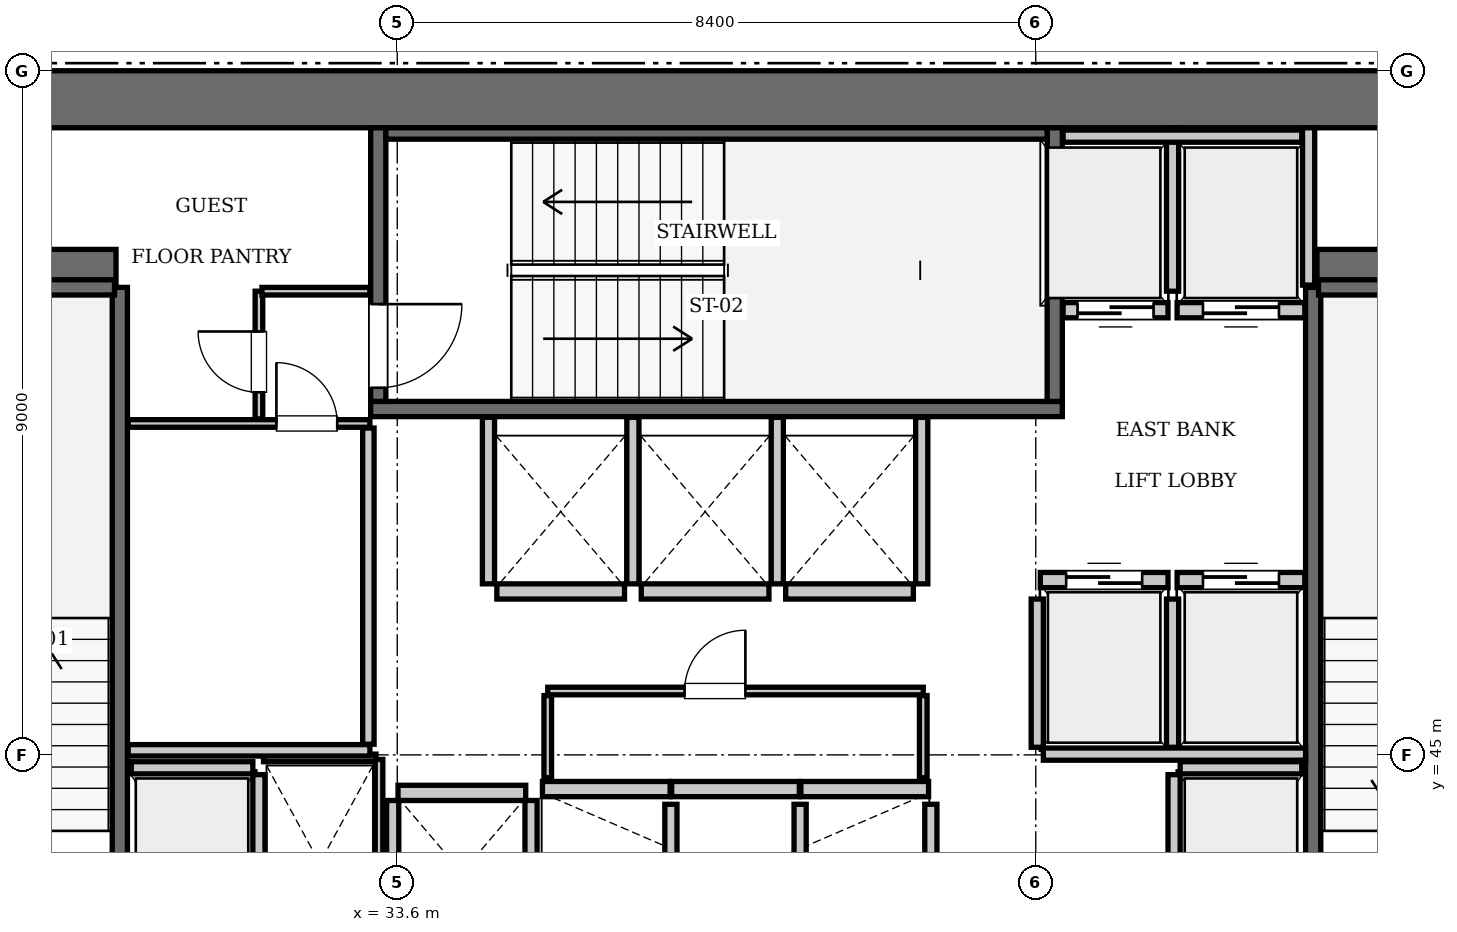
"""IFC4 building model, lengths in metres.
Left out: names, types, materials, properties, quantities, classifications, styles, units other than length and angle.
Written with IfcOpenShell. Run it as: python <this file> out.ifc"""

import sys

from ifc_helpers import new_model, si_unit, direction, frame, frame_2d, origin, place, context, subcontext, project, spatial, rectangle, extrude, element, fill, save


model = new_model("IFC4")
c1 = context("Model", 3, precision=1e-05, world=origin(), true_north=direction((0.0, 1.0)))
c2 = subcontext(c1, "Body", "Model", "MODEL_VIEW")
j1 = project(units=[si_unit("LENGTHUNIT", "METRE"), si_unit("PLANEANGLEUNIT", "RADIAN")], contexts=[c1])
p1 = place(None, origin())
s1 = spatial("IfcSite", under=j1, at=p1, CompositionType="ELEMENT")
p2 = place(p1, origin())
s2 = spatial("IfcBuilding", under=s1, at=p2, CompositionType="ELEMENT")
p3 = place(p2, frame((0.0, 0.0, 173.6)))
s3 = spatial("IfcBuildingStorey", under=s2, at=p3, CompositionType="ELEMENT", Elevation=173.6)
p4 = place(p3, frame((25.2, 53.625, 0.0), z_axis=(0.0, 0.0, 1.0), x_axis=(1.0, 0.0, 0.0)))
e1 = element("IfcWall", 1, at=p4, inside=s3, PredefinedType="SHEAR", context=c2, shape_type="SweptSolid", body=[
    extrude(rectangle(XDim=25.2, YDim=0.75, at=frame_2d((12.6, 0.0))), origin(), (0.0, 0.0, 1.0), 3.85),
])
for number, where, z_axis, x_axis in (
    (2, (25.95, 51.4, 0.0), (0.0, 0.0, 1.0), (1.0, 0.0, 0.0)),
    (3, (45.7, 51.4, 0.0), (0.0, 0.0, 1.0), (1.0, 0.0, 0.0)),
):
    element("IfcWall", number, at=place(p3, frame(where, z_axis=z_axis, x_axis=x_axis)), inside=s3, PredefinedType="SHEAR", context=c2, shape_type="SweptSolid", body=[
        extrude(rectangle(XDim=3.95, YDim=0.5, at=frame_2d((1.975, 0.0))), origin(), (0.0, 0.0, 1.0), 3.85),
    ])
p5 = place(p3, frame((29.95, 42.15, 0.0), z_axis=(0.0, 0.0, 1.0), x_axis=(0.0, 1.0, 0.0)))
e4 = element("IfcWall", 4, at=p5, inside=s3, PredefinedType="SOLIDWALL", context=c2, shape_type="SweptSolid", body=[
    extrude(rectangle(XDim=9.0, YDim=0.2, at=frame_2d((4.5, 0.0))), origin(), (0.0, 0.0, 1.0), 3.61),
])
p6 = place(p3, frame((26.38, 51.15, 0.0), z_axis=(0.0, 0.0, 1.0), x_axis=(1.0, 0.0, 0.0)))
e5 = element("IfcWall", 5, at=p6, inside=s3, PredefinedType="SOLIDWALL", context=c2, shape_type="SweptSolid", body=[
    extrude(rectangle(XDim=3.5, YDim=0.2, at=frame_2d((1.75, 0.0))), origin(), (0.0, 0.0, 1.0), 3.61),
])
p7 = place(p3, frame((33.25, 49.55, 0.0), z_axis=(0.0, 0.0, 1.0), x_axis=(1.0, 0.0, 0.0)))
e6 = element("IfcWall", 6, at=p7, inside=s3, PredefinedType="SOLIDWALL", context=c2, shape_type="SweptSolid", body=[
    extrude(rectangle(XDim=9.1, YDim=0.2, at=frame_2d((4.55, 0.0))), origin(), (0.0, 0.0, 1.0), 3.61),
])
p8 = place(p3, frame((42.25, 49.65, 0.0), z_axis=(0.0, 0.0, 1.0), x_axis=(0.0, 1.0, 0.0)))
e7 = element("IfcWall", 7, at=p8, inside=s3, PredefinedType="SOLIDWALL", context=c2, shape_type="SweptSolid", body=[
    extrude(rectangle(XDim=3.6, YDim=0.2, at=frame_2d((1.8, 0.0))), origin(), (0.0, 0.0, 1.0), 3.61),
])
p9 = place(p3, frame((33.35, 49.65, 0.0), z_axis=(0.0, 0.0, 1.0), x_axis=(0.0, 1.0, 0.0)))
e8 = element("IfcWall", 8, at=p9, inside=s3, PredefinedType="SOLIDWALL", context=c2, shape_type="SweptSolid", body=[
    extrude(rectangle(XDim=3.6, YDim=0.2, at=frame_2d((1.8, 0.0))), origin(), (0.0, 0.0, 1.0), 3.61),
])
p10 = place(p9, frame((0.18, 0.0, 0.0)))
e9 = element("IfcOpeningElement", 9, at=p10, cuts=e8, PredefinedType="OPENING", context=c2, shape_type="SweptSolid", body=[
    extrude(rectangle(XDim=1.1, YDim=2.15, at=frame_2d((0.55, 1.075))), frame((0.0, 0.11, 0.0), z_axis=(0.0, -1.0, 0.0), x_axis=(1.0, 0.0, 0.0)), (0.0, 0.0, 1.0), 0.22),
])
p11 = place(p3, frame((33.45, 53.175, 0.0), z_axis=(0.0, 0.0, 1.0), x_axis=(1.0, 0.0, 0.0)))
e10 = element("IfcWall", 10, at=p11, inside=s3, PredefinedType="SOLIDWALL", context=c2, shape_type="SweptSolid", body=[
    extrude(rectangle(XDim=8.7, YDim=0.15, at=frame_2d((4.35, 0.0))), origin(), (0.0, 0.0, 1.0), 3.61),
])
p12 = place(p3, frame((45.65, 42.15, 0.0), z_axis=(0.0, 0.0, 1.0), x_axis=(0.0, 1.0, 0.0)))
e11 = element("IfcWall", 11, at=p12, inside=s3, PredefinedType="SOLIDWALL", context=c2, shape_type="SweptSolid", body=[
    extrude(rectangle(XDim=9.0, YDim=0.2, at=frame_2d((4.5, 0.0))), origin(), (0.0, 0.0, 1.0), 3.61),
])
p13 = place(p3, frame((45.72, 51.15, 0.0), z_axis=(0.0, 0.0, 1.0), x_axis=(1.0, 0.0, 0.0)))
e12 = element("IfcWall", 12, at=p13, inside=s3, PredefinedType="SOLIDWALL", context=c2, shape_type="SweptSolid", body=[
    extrude(rectangle(XDim=3.5, YDim=0.2, at=frame_2d((1.75, 0.0))), origin(), (0.0, 0.0, 1.0), 3.61),
])
p14 = place(p3, frame((42.06, 47.3, 0.0), z_axis=(0.0, 0.0, 1.0), x_axis=(1.0, 0.0, 0.0)))
e13 = element("IfcWall", 13, at=p14, inside=s3, PredefinedType="SOLIDWALL", context=c2, shape_type="SweptSolid", body=[
    extrude(rectangle(XDim=1.68, YDim=0.2, at=frame_2d((0.84, 0.0))), origin(), (0.0, 0.0, 1.0), 3.61),
])
p15 = place(p14, frame((0.34, 0.0, 0.0)))
e14 = element("IfcOpeningElement", 14, at=p15, cuts=e13, PredefinedType="OPENING", context=c2, shape_type="SweptSolid", body=[
    extrude(rectangle(XDim=1.0, YDim=2.15, at=frame_2d((0.5, 1.075))), frame((0.0, 0.11, 0.0), z_axis=(0.0, -1.0, 0.0), x_axis=(1.0, 0.0, 0.0)), (0.0, 0.0, 1.0), 0.22),
])
p16 = place(p3, frame((43.86, 47.3, 0.0), z_axis=(0.0, 0.0, 1.0), x_axis=(1.0, 0.0, 0.0)))
e15 = element("IfcWall", 15, at=p16, inside=s3, PredefinedType="SOLIDWALL", context=c2, shape_type="SweptSolid", body=[
    extrude(rectangle(XDim=1.68, YDim=0.2, at=frame_2d((0.84, 0.0))), origin(), (0.0, 0.0, 1.0), 3.61),
])
p17 = place(p16, frame((0.34, 0.0, 0.0)))
e16 = element("IfcOpeningElement", 16, at=p17, cuts=e15, PredefinedType="OPENING", context=c2, shape_type="SweptSolid", body=[
    extrude(rectangle(XDim=1.0, YDim=2.15, at=frame_2d((0.5, 1.075))), frame((0.0, 0.11, 0.0), z_axis=(0.0, -1.0, 0.0), x_axis=(1.0, 0.0, 0.0)), (0.0, 0.0, 1.0), 0.22),
])
p18 = place(p3, frame((42.36, 50.85, 0.0), z_axis=(0.0, 0.0, 1.0), x_axis=(1.0, 0.0, 0.0)))
e17 = element("IfcWall", 17, at=p18, inside=s3, PredefinedType="SOLIDWALL", context=c2, shape_type="SweptSolid", body=[
    extrude(rectangle(XDim=1.38, YDim=0.2, at=frame_2d((0.69, 0.0))), origin(), (0.0, 0.0, 1.0), 3.61),
])
p19 = place(p18, frame((0.19, 0.0, 0.0)))
e18 = element("IfcOpeningElement", 18, at=p19, cuts=e17, PredefinedType="OPENING", context=c2, shape_type="SweptSolid", body=[
    extrude(rectangle(XDim=1.0, YDim=2.15, at=frame_2d((0.5, 1.075))), frame((0.0, 0.11, 0.0), z_axis=(0.0, -1.0, 0.0), x_axis=(1.0, 0.0, 0.0)), (0.0, 0.0, 1.0), 0.22),
])
p20 = place(p3, frame((43.86, 50.85, 0.0), z_axis=(0.0, 0.0, 1.0), x_axis=(1.0, 0.0, 0.0)))
e19 = element("IfcWall", 19, at=p20, inside=s3, PredefinedType="SOLIDWALL", context=c2, shape_type="SweptSolid", body=[
    extrude(rectangle(XDim=1.68, YDim=0.2, at=frame_2d((0.84, 0.0))), origin(), (0.0, 0.0, 1.0), 3.61),
])
p21 = place(p20, frame((0.34, 0.0, 0.0)))
e20 = element("IfcOpeningElement", 20, at=p21, cuts=e19, PredefinedType="OPENING", context=c2, shape_type="SweptSolid", body=[
    extrude(rectangle(XDim=1.0, YDim=2.15, at=frame_2d((0.5, 1.075))), frame((0.0, 0.11, 0.0), z_axis=(0.0, -1.0, 0.0), x_axis=(1.0, 0.0, 0.0)), (0.0, 0.0, 1.0), 0.22),
])
for number, where, z_axis, x_axis in (
    (21, (35.51, 44.55, 0.0), (0.0, 0.0, 1.0), (1.0, 0.0, 0.0)),
    (22, (37.21, 44.55, 0.0), (0.0, 0.0, 1.0), (1.0, 0.0, 0.0)),
):
    element("IfcWall", number, at=place(p3, frame(where, z_axis=z_axis, x_axis=x_axis)), inside=s3, PredefinedType="SOLIDWALL", context=c2, shape_type="SweptSolid", body=[
        extrude(rectangle(XDim=1.68, YDim=0.2, at=frame_2d((0.84, 0.0))), origin(), (0.0, 0.0, 1.0), 3.61),
    ])
for number, where, z_axis, x_axis in (
    (23, (38.91, 44.55, 0.0), (0.0, 0.0, 1.0), (1.0, 0.0, 0.0)),
    (24, (34.91, 47.15, 0.0), (0.0, 0.0, 1.0), (1.0, 0.0, 0.0)),
):
    element("IfcWall", number, at=place(p3, frame(where, z_axis=z_axis, x_axis=x_axis)), inside=s3, PredefinedType="SOLIDWALL", context=c2, shape_type="SweptSolid", body=[
        extrude(rectangle(XDim=1.68, YDim=0.2, at=frame_2d((0.84, 0.0))), origin(), (0.0, 0.0, 1.0), 3.61),
    ])
for number, where, z_axis, x_axis in (
    (25, (36.81, 47.15, 0.0), (0.0, 0.0, 1.0), (1.0, 0.0, 0.0)),
    (26, (38.71, 47.15, 0.0), (0.0, 0.0, 1.0), (1.0, 0.0, 0.0)),
    (27, (33.61, 44.5, 0.0), (0.0, 0.0, 1.0), (1.0, 0.0, 0.0)),
):
    element("IfcWall", number, at=place(p3, frame(where, z_axis=z_axis, x_axis=x_axis)), inside=s3, PredefinedType="SOLIDWALL", context=c2, shape_type="SweptSolid", body=[
        extrude(rectangle(XDim=1.68, YDim=0.2, at=frame_2d((0.84, 0.0))), origin(), (0.0, 0.0, 1.0), 3.61),
    ])
p22 = place(p3, frame((30.1, 44.83, 0.0), z_axis=(0.0, 0.0, 1.0), x_axis=(1.0, 0.0, 0.0)))
e28 = element("IfcWall", 28, at=p22, inside=s3, PredefinedType="SOLIDWALL", context=c2, shape_type="SweptSolid", body=[
    extrude(rectangle(XDim=1.6, YDim=0.16, at=frame_2d((0.8, 0.0))), origin(), (0.0, 0.0, 1.0), 3.61),
])
p23 = place(p3, frame((31.78, 42.15, 0.0), z_axis=(0.0, 0.0, 1.0), x_axis=(0.0, 1.0, 0.0)))
e29 = element("IfcWall", 29, at=p23, inside=s3, PredefinedType="SOLIDWALL", context=c2, shape_type="SweptSolid", body=[
    extrude(rectangle(XDim=2.59, YDim=0.16, at=frame_2d((1.295, 0.0))), origin(), (0.0, 0.0, 1.0), 3.61),
])
p24 = place(p3, frame((43.9, 44.83, 0.0), z_axis=(0.0, 0.0, 1.0), x_axis=(1.0, 0.0, 0.0)))
e30 = element("IfcWall", 30, at=p24, inside=s3, PredefinedType="SOLIDWALL", context=c2, shape_type="SweptSolid", body=[
    extrude(rectangle(XDim=1.6, YDim=0.16, at=frame_2d((0.8, 0.0))), origin(), (0.0, 0.0, 1.0), 3.61),
])
p25 = place(p3, frame((43.82, 42.15, 0.0), z_axis=(0.0, 0.0, 1.0), x_axis=(0.0, 1.0, 0.0)))
e31 = element("IfcWall", 31, at=p25, inside=s3, PredefinedType="SOLIDWALL", context=c2, shape_type="SweptSolid", body=[
    extrude(rectangle(XDim=2.59, YDim=0.16, at=frame_2d((1.295, 0.0))), origin(), (0.0, 0.0, 1.0), 3.61),
])
for number, where, z_axis, x_axis in (
    (32, (42.02, 45.1, 0.0), (0.0, 0.0, 1.0), (0.0, 1.0, 0.0)),
    (33, (43.8, 45.1, 0.0), (0.0, 0.0, 1.0), (0.0, 1.0, 0.0)),
):
    element("IfcWall", number, at=place(p3, frame(where, z_axis=z_axis, x_axis=x_axis)), inside=s3, PredefinedType="SOLIDWALL", context=c2, shape_type="SweptSolid", body=[
        extrude(rectangle(XDim=1.95, YDim=0.16, at=frame_2d((0.975, 0.0))), origin(), (0.0, 0.0, 1.0), 3.61),
    ])
p26 = place(p3, frame((42.1, 45.01, 0.0), z_axis=(0.0, 0.0, 1.0), x_axis=(1.0, 0.0, 0.0)))
e34 = element("IfcWall", 34, at=p26, inside=s3, PredefinedType="SOLIDWALL", context=c2, shape_type="SweptSolid", body=[
    extrude(rectangle(XDim=3.45, YDim=0.16, at=frame_2d((1.725, 0.0))), origin(), (0.0, 0.0, 1.0), 3.61),
])
p27 = place(p3, frame((45.59, 51.18, 0.0), z_axis=(0.0, 0.0, 1.0), x_axis=(0.0, 1.0, 0.0)))
e35 = element("IfcWall", 35, at=p27, inside=s3, PredefinedType="SOLIDWALL", context=c2, shape_type="SweptSolid", body=[
    extrude(rectangle(XDim=2.07, YDim=0.16, at=frame_2d((1.035, 0.0))), origin(), (0.0, 0.0, 1.0), 3.61),
])
p28 = place(p3, frame((43.8, 51.1, 0.0), z_axis=(0.0, 0.0, 1.0), x_axis=(0.0, 1.0, 0.0)))
e36 = element("IfcWall", 36, at=p28, inside=s3, PredefinedType="SOLIDWALL", context=c2, shape_type="SweptSolid", body=[
    extrude(rectangle(XDim=2.15, YDim=0.16, at=frame_2d((1.075, 0.0))), origin(), (0.0, 0.0, 1.0), 3.61),
])
p29 = place(p3, frame((42.36, 53.14, 0.0), z_axis=(0.0, 0.0, 1.0), x_axis=(1.0, 0.0, 0.0)))
e37 = element("IfcWall", 37, at=p29, inside=s3, PredefinedType="SOLIDWALL", context=c2, shape_type="SweptSolid", body=[
    extrude(rectangle(XDim=3.14, YDim=0.16, at=frame_2d((1.57, 0.0))), origin(), (0.0, 0.0, 1.0), 3.61),
])
for number, where, z_axis, x_axis in (
    (38, (37.2, 42.15, 0.0), (0.0, 0.0, 1.0), (0.0, 1.0, 0.0)),
    (39, (38.9, 42.15, 0.0), (0.0, 0.0, 1.0), (0.0, 1.0, 0.0)),
    (40, (40.62, 42.15, 0.0), (0.0, 0.0, 1.0), (0.0, 1.0, 0.0)),
):
    element("IfcWall", number, at=place(p3, frame(where, z_axis=z_axis, x_axis=x_axis)), inside=s3, PredefinedType="SOLIDWALL", context=c2, shape_type="SweptSolid", body=[
        extrude(rectangle(XDim=2.2, YDim=0.16, at=frame_2d((1.1, 0.0))), origin(), (0.0, 0.0, 1.0), 3.61),
    ])
for number, where, z_axis, x_axis in (
    (41, (34.8, 47.25, 0.0), (0.0, 0.0, 1.0), (0.0, 1.0, 0.0)),
    (42, (36.7, 47.25, 0.0), (0.0, 0.0, 1.0), (0.0, 1.0, 0.0)),
    (43, (38.6, 47.25, 0.0), (0.0, 0.0, 1.0), (0.0, 1.0, 0.0)),
    (44, (40.5, 47.25, 0.0), (0.0, 0.0, 1.0), (0.0, 1.0, 0.0)),
):
    element("IfcWall", number, at=place(p3, frame(where, z_axis=z_axis, x_axis=x_axis)), inside=s3, PredefinedType="SOLIDWALL", context=c2, shape_type="SweptSolid", body=[
        extrude(rectangle(XDim=2.19, YDim=0.16, at=frame_2d((1.095, 0.0))), origin(), (0.0, 0.0, 1.0), 3.61),
    ])
for number, where, z_axis, x_axis in (
    (45, (33.54, 42.15, 0.0), (0.0, 0.0, 1.0), (0.0, 1.0, 0.0)),
    (46, (35.36, 42.15, 0.0), (0.0, 0.0, 1.0), (0.0, 1.0, 0.0)),
):
    element("IfcWall", number, at=place(p3, frame(where, z_axis=z_axis, x_axis=x_axis)), inside=s3, PredefinedType="SOLIDWALL", context=c2, shape_type="SweptSolid", body=[
        extrude(rectangle(XDim=2.25, YDim=0.16, at=frame_2d((1.125, 0.0))), origin(), (0.0, 0.0, 1.0), 3.61),
    ])
p30 = place(p3, frame((31.84, 44.96, 0.0), z_axis=(0.0, 0.0, 1.0), x_axis=(1.0, 0.0, 0.0)))
e47 = element("IfcWall", 47, at=p30, inside=s3, PredefinedType="PARTITIONING", context=c2, shape_type="SweptSolid", body=[
    extrude(rectangle(XDim=1.48, YDim=0.1, at=frame_2d((0.74, 0.0))), origin(), (0.0, 0.0, 1.0), 3.61),
])
p31 = place(p3, frame((33.36, 42.21, 0.0), z_axis=(0.0, 0.0, 1.0), x_axis=(0.0, 1.0, 0.0)))
e48 = element("IfcWall", 48, at=p31, inside=s3, PredefinedType="PARTITIONING", context=c2, shape_type="SweptSolid", body=[
    extrude(rectangle(XDim=2.73, YDim=0.1, at=frame_2d((1.365, 0.0))), origin(), (0.0, 0.0, 1.0), 3.61),
])
p32 = place(p3, frame((35.58, 45.84, 0.0), z_axis=(0.0, 0.0, 1.0), x_axis=(1.0, 0.0, 0.0)))
e49 = element("IfcWall", 49, at=p32, inside=s3, PredefinedType="PARTITIONING", context=c2, shape_type="SweptSolid", body=[
    extrude(rectangle(XDim=4.94, YDim=0.1, at=frame_2d((2.47, 0.0))), origin(), (0.0, 0.0, 1.0), 3.61),
])
p33 = place(p32, frame((1.8, 0.0, 0.0)))
e50 = element("IfcOpeningElement", 50, at=p33, cuts=e49, PredefinedType="OPENING", context=c2, shape_type="SweptSolid", body=[
    extrude(rectangle(XDim=0.8, YDim=2.05, at=frame_2d((0.4, 1.025))), frame((0.0, 0.06, 0.0), z_axis=(0.0, -1.0, 0.0), x_axis=(1.0, 0.0, 0.0)), (0.0, 0.0, 1.0), 0.12),
])
for number, where, z_axis, x_axis in (
    (51, (35.58, 44.7, 0.0), (0.0, 0.0, 1.0), (0.0, 1.0, 0.0)),
    (52, (40.52, 44.7, 0.0), (0.0, 0.0, 1.0), (0.0, 1.0, 0.0)),
):
    element("IfcWall", number, at=place(p3, frame(where, z_axis=z_axis, x_axis=x_axis)), inside=s3, PredefinedType="PARTITIONING", context=c2, shape_type="SweptSolid", body=[
        extrude(rectangle(XDim=1.08, YDim=0.1, at=frame_2d((0.54, 0.0))), origin(), (0.0, 0.0, 1.0), 3.61),
    ])
p34 = place(p3, frame((30.06, 45.06, 0.0), z_axis=(0.0, 0.0, 1.0), x_axis=(1.0, 0.0, 0.0)))
e53 = element("IfcWall", 53, at=p34, inside=s3, PredefinedType="PARTITIONING", context=c2, shape_type="SweptSolid", body=[
    extrude(rectangle(XDim=3.18, YDim=0.15, at=frame_2d((1.59, 0.0))), origin(), (0.0, 0.0, 1.0), 3.61),
])
p35 = place(p3, frame((33.22, 45.14, 0.0), z_axis=(0.0, 0.0, 1.0), x_axis=(0.0, 1.0, 0.0)))
e54 = element("IfcWall", 54, at=p35, inside=s3, PredefinedType="PARTITIONING", context=c2, shape_type="SweptSolid", body=[
    extrude(rectangle(XDim=4.16, YDim=0.15, at=frame_2d((2.08, 0.0))), origin(), (0.0, 0.0, 1.0), 3.61),
])
p36 = place(p3, frame((30.06, 49.36, 0.0), z_axis=(0.0, 0.0, 1.0), x_axis=(1.0, 0.0, 0.0)))
e55 = element("IfcWall", 55, at=p36, inside=s3, PredefinedType="PARTITIONING", context=c2, shape_type="SweptSolid", body=[
    extrude(rectangle(XDim=3.18, YDim=0.1, at=frame_2d((1.59, 0.0))), origin(), (0.0, 0.0, 1.0), 3.61),
])
p37 = place(p36, frame((1.95, 0.0, 0.0)))
e56 = element("IfcOpeningElement", 56, at=p37, cuts=e55, PredefinedType="OPENING", context=c2, shape_type="SweptSolid", body=[
    extrude(rectangle(XDim=0.8, YDim=2.05, at=frame_2d((0.4, 1.025))), frame((0.0, 0.06, 0.0), z_axis=(0.0, -1.0, 0.0), x_axis=(1.0, 0.0, 0.0)), (0.0, 0.0, 1.0), 0.12),
])
p38 = place(p3, frame((31.78, 49.42, 0.0), z_axis=(0.0, 0.0, 1.0), x_axis=(0.0, 1.0, 0.0)))
e57 = element("IfcWall", 57, at=p38, inside=s3, PredefinedType="PARTITIONING", context=c2, shape_type="SweptSolid", body=[
    extrude(rectangle(XDim=1.68, YDim=0.1, at=frame_2d((0.84, 0.0))), origin(), (0.0, 0.0, 1.0), 3.61),
])
p39 = place(p38, frame((0.35, 0.0, 0.0)))
e58 = element("IfcOpeningElement", 58, at=p39, cuts=e57, PredefinedType="OPENING", context=c2, shape_type="SweptSolid", body=[
    extrude(rectangle(XDim=0.8, YDim=2.05, at=frame_2d((0.4, 1.025))), frame((0.0, 0.06, 0.0), z_axis=(0.0, -1.0, 0.0), x_axis=(1.0, 0.0, 0.0)), (0.0, 0.0, 1.0), 0.12),
])
p40 = place(p3, frame((31.82, 51.1, 0.0), z_axis=(0.0, 0.0, 1.0), x_axis=(1.0, 0.0, 0.0)))
e59 = element("IfcWall", 59, at=p40, inside=s3, PredefinedType="PARTITIONING", context=c2, shape_type="SweptSolid", body=[
    extrude(rectangle(XDim=1.42, YDim=0.1, at=frame_2d((0.71, 0.0))), origin(), (0.0, 0.0, 1.0), 3.61),
])
p41 = place(p10, frame((1.1, 0.0, 0.0), z_axis=(0.0, 0.0, 1.0), x_axis=(-1.0, 0.0, 0.0)))
e60 = element("IfcDoor", 60, at=p41, inside=s3, OperationType="SINGLE_SWING_LEFT", PredefinedType="DOOR", context=c2, shape_type="SweptSolid", body=[
    extrude(rectangle(XDim=1.1, YDim=2.15, at=frame_2d((0.55, 1.075))), frame((0.0, 0.025, 0.0), z_axis=(0.0, -1.0, 0.0), x_axis=(1.0, 0.0, 0.0)), (0.0, 0.0, 1.0), 0.05),
])
fill(e9, e60)
p42 = place(p15, origin())
e61 = element("IfcDoor", 61, at=p42, inside=s3, OperationType="SLIDING_TO_LEFT", PredefinedType="DOOR", context=c2, shape_type="SweptSolid", body=[
    extrude(rectangle(XDim=1.0, YDim=2.15, at=frame_2d((0.5, 1.075))), frame((0.0, 0.025, 0.0), z_axis=(0.0, -1.0, 0.0), x_axis=(1.0, 0.0, 0.0)), (0.0, 0.0, 1.0), 0.05),
])
fill(e14, e61)
p43 = place(p17, origin())
e62 = element("IfcDoor", 62, at=p43, inside=s3, OperationType="SLIDING_TO_LEFT", PredefinedType="DOOR", context=c2, shape_type="SweptSolid", body=[
    extrude(rectangle(XDim=1.0, YDim=2.15, at=frame_2d((0.5, 1.075))), frame((0.0, 0.025, 0.0), z_axis=(0.0, -1.0, 0.0), x_axis=(1.0, 0.0, 0.0)), (0.0, 0.0, 1.0), 0.05),
])
fill(e16, e62)
p44 = place(p19, frame((1.0, 0.0, 0.0), z_axis=(0.0, 0.0, 1.0), x_axis=(-1.0, 0.0, 0.0)))
e63 = element("IfcDoor", 63, at=p44, inside=s3, OperationType="SLIDING_TO_LEFT", PredefinedType="DOOR", context=c2, shape_type="SweptSolid", body=[
    extrude(rectangle(XDim=1.0, YDim=2.15, at=frame_2d((0.5, 1.075))), frame((0.0, 0.025, 0.0), z_axis=(0.0, -1.0, 0.0), x_axis=(1.0, 0.0, 0.0)), (0.0, 0.0, 1.0), 0.05),
])
fill(e18, e63)
p45 = place(p21, frame((1.0, 0.0, 0.0), z_axis=(0.0, 0.0, 1.0), x_axis=(-1.0, 0.0, 0.0)))
e64 = element("IfcDoor", 64, at=p45, inside=s3, OperationType="SLIDING_TO_LEFT", PredefinedType="DOOR", context=c2, shape_type="SweptSolid", body=[
    extrude(rectangle(XDim=1.0, YDim=2.15, at=frame_2d((0.5, 1.075))), frame((0.0, 0.025, 0.0), z_axis=(0.0, -1.0, 0.0), x_axis=(1.0, 0.0, 0.0)), (0.0, 0.0, 1.0), 0.05),
])
fill(e20, e64)
p46 = place(p33, origin())
e65 = element("IfcDoor", 65, at=p46, inside=s3, OperationType="SINGLE_SWING_RIGHT", PredefinedType="DOOR", context=c2, shape_type="SweptSolid", body=[
    extrude(rectangle(XDim=0.8, YDim=2.05, at=frame_2d((0.4, 1.025))), frame((0.0, 0.025, 0.0), z_axis=(0.0, -1.0, 0.0), x_axis=(1.0, 0.0, 0.0)), (0.0, 0.0, 1.0), 0.05),
])
fill(e50, e65)
p47 = place(p37, origin())
e66 = element("IfcDoor", 66, at=p47, inside=s3, OperationType="SINGLE_SWING_LEFT", PredefinedType="DOOR", context=c2, shape_type="SweptSolid", body=[
    extrude(rectangle(XDim=0.8, YDim=2.05, at=frame_2d((0.4, 1.025))), frame((0.0, 0.025, 0.0), z_axis=(0.0, -1.0, 0.0), x_axis=(1.0, 0.0, 0.0)), (0.0, 0.0, 1.0), 0.05),
])
fill(e56, e66)
p48 = place(p39, origin())
e67 = element("IfcDoor", 67, at=p48, inside=s3, OperationType="SINGLE_SWING_RIGHT", PredefinedType="DOOR", context=c2, shape_type="SweptSolid", body=[
    extrude(rectangle(XDim=0.8, YDim=2.05, at=frame_2d((0.4, 1.025))), frame((0.0, 0.025, 0.0), z_axis=(0.0, -1.0, 0.0), x_axis=(1.0, 0.0, 0.0)), (0.0, 0.0, 1.0), 0.05),
])
fill(e58, e67)
save(model, sys.argv[1])
